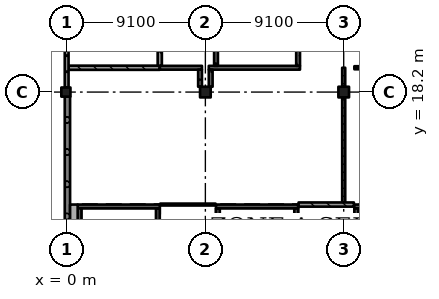
"""IFC4 building model, lengths in metres.
Left out: names, types, materials, properties, quantities, classifications, styles, units other than length and angle.
Written with IfcOpenShell. Run it as: python <this file> out.ifc"""

import sys

from ifc_helpers import new_model, si_unit, direction, frame, frame_2d, origin, origin_2d, place, context, subcontext, project, spatial, rectangle, extrude, element, fill, save


model = new_model("IFC4")
c1 = context("Model", 3, precision=1e-05, world=origin(), true_north=direction((0.0, 1.0)))
c2 = subcontext(c1, "Body", "Model", "MODEL_VIEW")
j1 = project(units=[si_unit("LENGTHUNIT", "METRE"), si_unit("PLANEANGLEUNIT", "RADIAN")], contexts=[c1])
p1 = place(None, origin())
s1 = spatial("IfcSite", under=j1, at=p1, CompositionType="ELEMENT")
p2 = place(p1, origin())
s2 = spatial("IfcBuilding", under=s1, at=p2, CompositionType="ELEMENT")
p3 = place(p2, frame((0.0, 0.0, 15.47)))
s3 = spatial("IfcBuildingStorey", under=s2, at=p3, CompositionType="ELEMENT", Elevation=15.47)
p4 = place(p3, frame((-0.075, 18.2, 0.0), z_axis=(0.0, 0.0, 1.0), x_axis=(1.0, 0.0, 0.0)))
e1 = element("IfcColumn", 1, at=p4, inside=s3, PredefinedType="COLUMN", context=c2, shape_type="SweptSolid", body=[
    extrude(rectangle(XDim=0.6, YDim=0.6, at=origin_2d()), origin(), (0.0, 0.0, 1.0), 4.55),
])
for number, where, z_axis, x_axis in (
    (2, (9.1, 18.2, 0.0), (0.0, 0.0, 1.0), (1.0, 0.0, 0.0)),
    (3, (18.2, 18.2, 0.0), (0.0, 0.0, 1.0), (1.0, 0.0, 0.0)),
):
    element("IfcColumn", number, at=place(p3, frame(where, z_axis=z_axis, x_axis=x_axis)), inside=s3, PredefinedType="COLUMN", context=c2, shape_type="SweptSolid", body=[
        extrude(rectangle(XDim=0.7, YDim=0.7, at=origin_2d()), origin(), (0.0, 0.0, 1.0), 4.55),
    ])
p5 = place(p3, frame((6.1, 10.675, 0.0), z_axis=(0.0, 0.0, 1.0), x_axis=(-1.0, 0.0, 0.0)))
e4 = element("IfcWall", 4, at=p5, inside=s3, PredefinedType="SHEAR", context=c2, shape_type="SweptSolid", body=[
    extrude(rectangle(XDim=5.4, YDim=0.25, at=frame_2d((2.7, 0.0))), origin(), (0.0, 0.0, 1.0), 4.55),
])
p6 = place(p5, frame((1.5, 0.0, 0.0)))
e5 = element("IfcOpeningElement", 5, at=p6, cuts=e4, PredefinedType="OPENING", context=c2, shape_type="SweptSolid", body=[
    extrude(rectangle(XDim=2.4, YDim=2.1, at=frame_2d((1.2, 1.05))), frame((0.0, 0.135, 0.0), z_axis=(0.0, -1.0, 0.0), x_axis=(1.0, 0.0, 0.0)), (0.0, 0.0, 1.0), 0.27),
])
for number, where, z_axis, x_axis in (
    (6, (0.825, 10.55, 0.0), (0.0, 0.0, 1.0), (0.0, -1.0, 0.0)),
    (7, (5.975, 10.55, 0.0), (0.0, 0.0, 1.0), (0.0, -1.0, 0.0)),
):
    element("IfcWall", number, at=place(p3, frame(where, z_axis=z_axis, x_axis=x_axis)), inside=s3, PredefinedType="SHEAR", context=c2, shape_type="SweptSolid", body=[
        extrude(rectangle(XDim=9.6, YDim=0.25, at=frame_2d((4.8, 0.0))), origin(), (0.0, 0.0, 1.0), 4.55),
    ])
p7 = place(p3, frame((15.2, 10.675, 0.0), z_axis=(0.0, 0.0, 1.0), x_axis=(-1.0, 0.0, 0.0)))
e8 = element("IfcWall", 8, at=p7, inside=s3, PredefinedType="SHEAR", context=c2, shape_type="SweptSolid", body=[
    extrude(rectangle(XDim=5.4, YDim=0.25, at=frame_2d((2.7, 0.0))), origin(), (0.0, 0.0, 1.0), 4.55),
])
p8 = place(p7, frame((1.5, 0.0, 0.0)))
e9 = element("IfcOpeningElement", 9, at=p8, cuts=e8, PredefinedType="OPENING", context=c2, shape_type="SweptSolid", body=[
    extrude(rectangle(XDim=2.4, YDim=2.1, at=frame_2d((1.2, 1.05))), frame((0.0, 0.135, 0.0), z_axis=(0.0, -1.0, 0.0), x_axis=(1.0, 0.0, 0.0)), (0.0, 0.0, 1.0), 0.27),
])
for number, where, z_axis, x_axis in (
    (10, (9.925, 10.55, 0.0), (0.0, 0.0, 1.0), (0.0, -1.0, 0.0)),
    (11, (15.075, 10.55, 0.0), (0.0, 0.0, 1.0), (0.0, -1.0, 0.0)),
):
    element("IfcWall", number, at=place(p3, frame(where, z_axis=z_axis, x_axis=x_axis)), inside=s3, PredefinedType="SHEAR", context=c2, shape_type="SweptSolid", body=[
        extrude(rectangle(XDim=9.6, YDim=0.25, at=frame_2d((4.8, 0.0))), origin(), (0.0, 0.0, 1.0), 4.55),
    ])
p9 = place(p3, frame((24.3, 10.675, 0.0), z_axis=(0.0, 0.0, 1.0), x_axis=(-1.0, 0.0, 0.0)))
e12 = element("IfcWall", 12, at=p9, inside=s3, PredefinedType="SHEAR", context=c2, shape_type="SweptSolid", body=[
    extrude(rectangle(XDim=5.4, YDim=0.25, at=frame_2d((2.7, 0.0))), origin(), (0.0, 0.0, 1.0), 4.55),
])
p10 = place(p9, frame((1.5, 0.0, 0.0)))
e13 = element("IfcOpeningElement", 13, at=p10, cuts=e12, PredefinedType="OPENING", context=c2, shape_type="SweptSolid", body=[
    extrude(rectangle(XDim=2.4, YDim=2.1, at=frame_2d((1.2, 1.05))), frame((0.0, 0.135, 0.0), z_axis=(0.0, -1.0, 0.0), x_axis=(1.0, 0.0, 0.0)), (0.0, 0.0, 1.0), 0.27),
])
p11 = place(p3, frame((19.025, 10.55, 0.0), z_axis=(0.0, 0.0, 1.0), x_axis=(0.0, -1.0, 0.0)))
e14 = element("IfcWall", 14, at=p11, inside=s3, PredefinedType="SHEAR", context=c2, shape_type="SweptSolid", body=[
    extrude(rectangle(XDim=9.6, YDim=0.25, at=frame_2d((4.8, 0.0))), origin(), (0.0, 0.0, 1.0), 4.55),
])
p12 = place(p3, frame((-0.025, 27.0, 0.0), z_axis=(0.0, 0.0, 1.0), x_axis=(0.0, -1.0, 0.0)))
e15 = element("IfcWall", 15, at=p12, inside=s3, PredefinedType="SOLIDWALL", context=c2, shape_type="SweptSolid", body=[
    extrude(rectangle(XDim=8.5, YDim=0.25, at=frame_2d((4.25, 0.0))), origin(), (0.0, 0.0, 1.0), 3.55),
])
p13 = place(p3, frame((0.025, 17.9, 0.0), z_axis=(0.0, 0.0, 1.0), x_axis=(0.0, -1.0, 0.0)))
e16 = element("IfcWall", 16, at=p13, inside=s3, PredefinedType="SOLIDWALL", context=c2, shape_type="SweptSolid", body=[
    extrude(rectangle(XDim=8.55, YDim=0.35, at=frame_2d((4.275, 0.0))), origin(), (0.0, 0.0, 1.0), 3.55),
])
p14 = place(p3, frame((0.45, 0.7, 0.0), z_axis=(0.0, 0.0, 1.0), x_axis=(0.0, 1.0, 0.0)))
e17 = element("IfcWall", 17, at=p14, inside=s3, PredefinedType="SOLIDWALL", context=c2, shape_type="SweptSolid", body=[
    extrude(rectangle(XDim=10.1, YDim=0.5, at=frame_2d((5.05, 0.0))), origin(), (0.0, 0.0, 1.0), 4.3),
])
p15 = place(p3, frame((0.1, 19.8, 0.0), z_axis=(0.0, 0.0, 1.0), x_axis=(1.0, 0.0, 0.0)))
e18 = element("IfcWall", 18, at=p15, inside=s3, PredefinedType="SOLIDWALL", context=c2, shape_type="SweptSolid", body=[
    extrude(rectangle(XDim=6.0, YDim=0.275, at=frame_2d((3.0, 0.0))), origin(), (0.0, 0.0, 1.0), 4.3),
])
p16 = place(p15, frame((2.65, 0.0, 0.0)))
e19 = element("IfcOpeningElement", 19, at=p16, cuts=e18, PredefinedType="OPENING", context=c2, shape_type="SweptSolid", body=[
    extrude(rectangle(XDim=1.2, YDim=2.4, at=frame_2d((0.6, 1.2))), frame((0.0, 0.147, 0.0), z_axis=(0.0, -1.0, 0.0), x_axis=(1.0, 0.0, 0.0)), (0.0, 0.0, 1.0), 0.295),
])
p17 = place(p3, frame((6.1, 19.8, 0.0), z_axis=(0.0, 0.0, 1.0), x_axis=(1.0, 0.0, 0.0)))
e20 = element("IfcWall", 20, at=p17, inside=s3, PredefinedType="SOLIDWALL", context=c2, shape_type="SweptSolid", body=[
    extrude(rectangle(XDim=2.775, YDim=0.25, at=frame_2d((1.387, 0.0))), origin(), (0.0, 0.0, 1.0), 4.3),
])
p18 = place(p17, frame((0.95, 0.0, 0.0)))
e21 = element("IfcOpeningElement", 21, at=p18, cuts=e20, PredefinedType="OPENING", context=c2, shape_type="SweptSolid", body=[
    extrude(rectangle(XDim=0.8, YDim=2.1, at=frame_2d((0.4, 1.05))), frame((0.0, 0.135, 0.0), z_axis=(0.0, -1.0, 0.0), x_axis=(1.0, 0.0, 0.0)), (0.0, 0.0, 1.0), 0.27),
])
p19 = place(p3, frame((6.1, 29.762, 0.0), z_axis=(0.0, 0.0, 1.0), x_axis=(0.0, -1.0, 0.0)))
e22 = element("IfcWall", 22, at=p19, inside=s3, PredefinedType="SOLIDWALL", context=c2, shape_type="SweptSolid", body=[
    extrude(rectangle(XDim=9.825, YDim=0.275, at=frame_2d((4.913, 0.0))), origin(), (0.0, 0.0, 1.0), 4.3),
])
p20 = place(p3, frame((8.75, 19.675, 0.0), z_axis=(0.0, 0.0, 1.0), x_axis=(0.0, -1.0, 0.0)))
e23 = element("IfcWall", 23, at=p20, inside=s3, PredefinedType="SOLIDWALL", context=c2, shape_type="SweptSolid", body=[
    extrude(rectangle(XDim=1.125, YDim=0.25, at=frame_2d((0.562, 0.0))), origin(), (0.0, 0.0, 1.0), 4.3),
])
p21 = place(p3, frame((9.325, 19.8, 0.0), z_axis=(0.0, 0.0, 1.0), x_axis=(1.0, 0.0, 0.0)))
e24 = element("IfcWall", 24, at=p21, inside=s3, PredefinedType="SOLIDWALL", context=c2, shape_type="SweptSolid", body=[
    extrude(rectangle(XDim=6.0, YDim=0.25, at=frame_2d((3.0, 0.0))), origin(), (0.0, 0.0, 1.0), 4.3),
])
p22 = place(p21, frame((2.825, 0.0, 0.0)))
e25 = element("IfcOpeningElement", 25, at=p22, cuts=e24, PredefinedType="OPENING", context=c2, shape_type="SweptSolid", body=[
    extrude(rectangle(XDim=0.8, YDim=2.1, at=frame_2d((0.4, 1.05))), frame((0.0, 0.135, 0.0), z_axis=(0.0, -1.0, 0.0), x_axis=(1.0, 0.0, 0.0)), (0.0, 0.0, 1.0), 0.27),
])
p23 = place(p3, frame((9.45, 18.55, 0.0), z_axis=(0.0, 0.0, 1.0), x_axis=(0.0, 1.0, 0.0)))
e26 = element("IfcWall", 26, at=p23, inside=s3, PredefinedType="SOLIDWALL", context=c2, shape_type="SweptSolid", body=[
    extrude(rectangle(XDim=1.125, YDim=0.25, at=frame_2d((0.562, 0.0))), origin(), (0.0, 0.0, 1.0), 4.3),
])
p24 = place(p3, frame((9.77, 10.8, 0.0), z_axis=(0.0, 0.0, 1.0), x_axis=(-1.0, 0.0, 0.0)))
e27 = element("IfcWall", 27, at=p24, inside=s3, PredefinedType="PARTITIONING", context=c2, shape_type="SweptSolid", body=[
    extrude(rectangle(XDim=3.64, YDim=0.125, at=frame_2d((1.82, 0.0))), origin(), (0.0, 0.0, 1.0), 4.3),
])
p25 = place(p24, frame((1.35, 0.0, 0.0)))
e28 = element("IfcOpeningElement", 28, at=p25, cuts=e27, PredefinedType="OPENING", context=c2, shape_type="SweptSolid", body=[
    extrude(rectangle(XDim=0.9, YDim=2.1, at=frame_2d((0.45, 1.05))), frame((0.0, 0.073, 0.0), z_axis=(0.0, -1.0, 0.0), x_axis=(1.0, 0.0, 0.0)), (0.0, 0.0, 1.0), 0.145),
])
p26 = place(p3, frame((9.8, 19.925, 0.0), z_axis=(0.0, 0.0, 1.0), x_axis=(0.0, 1.0, 0.0)))
e29 = element("IfcWall", 29, at=p26, inside=s3, PredefinedType="SOLIDWALL", context=c2, shape_type="SweptSolid", body=[
    extrude(rectangle(XDim=6.9, YDim=0.25, at=frame_2d((3.45, 0.0))), origin(), (0.0, 0.0, 1.0), 4.3),
])
p27 = place(p3, frame((15.2, 29.775, 0.0), z_axis=(0.0, 0.0, 1.0), x_axis=(0.0, -1.0, 0.0)))
e30 = element("IfcWall", 30, at=p27, inside=s3, PredefinedType="SOLIDWALL", context=c2, shape_type="SweptSolid", body=[
    extrude(rectangle(XDim=9.85, YDim=0.25, at=frame_2d((4.925, 0.0))), origin(), (0.0, 0.0, 1.0), 4.3),
])
p28 = place(p3, frame((15.23, 10.8, 0.0), z_axis=(0.0, 0.0, 1.0), x_axis=(1.0, 0.0, 0.0)))
e31 = element("IfcWall", 31, at=p28, inside=s3, PredefinedType="SOLIDWALL", context=c2, shape_type="SweptSolid", body=[
    extrude(rectangle(XDim=3.64, YDim=0.275, at=frame_2d((1.82, 0.0))), origin(), (0.0, 0.0, 1.0), 4.3),
])
p29 = place(p28, frame((0.92, 0.0, 0.0)))
e32 = element("IfcOpeningElement", 32, at=p29, cuts=e31, PredefinedType="OPENING", context=c2, shape_type="SweptSolid", body=[
    extrude(rectangle(XDim=1.2, YDim=2.4, at=frame_2d((0.6, 1.2))), frame((0.0, 0.147, 0.0), z_axis=(0.0, -1.0, 0.0), x_axis=(1.0, 0.0, 0.0)), (0.0, 0.0, 1.0), 0.295),
])
p30 = place(p3, frame((18.2, 17.85, 0.0), z_axis=(0.0, 0.0, 1.0), x_axis=(0.0, -1.0, 0.0)))
e33 = element("IfcWall", 33, at=p30, inside=s3, PredefinedType="PARTITIONING", context=c2, shape_type="SweptSolid", body=[
    extrude(rectangle(XDim=6.913, YDim=0.2, at=frame_2d((3.456, 0.0))), origin(), (0.0, 0.0, 1.0), 3.55),
])
p31 = place(p30, frame((0.85, 0.0, 0.0)))
e34 = element("IfcOpeningElement", 34, at=p31, cuts=e33, PredefinedType="OPENING", context=c2, shape_type="SweptSolid", body=[
    extrude(rectangle(XDim=1.8, YDim=2.4, at=frame_2d((0.9, 1.2))), frame((0.0, 0.11, 0.0), z_axis=(0.0, -1.0, 0.0), x_axis=(1.0, 0.0, 0.0)), (0.0, 0.0, 1.0), 0.22),
])
p32 = place(p30, frame((4.25, 0.0, 0.0)))
e35 = element("IfcOpeningElement", 35, at=p32, cuts=e33, PredefinedType="OPENING", context=c2, shape_type="SweptSolid", body=[
    extrude(rectangle(XDim=1.8, YDim=2.4, at=frame_2d((0.9, 1.2))), frame((0.0, 0.11, 0.0), z_axis=(0.0, -1.0, 0.0), x_axis=(1.0, 0.0, 0.0)), (0.0, 0.0, 1.0), 0.22),
])
p33 = place(p3, frame((18.2, 19.8, 0.0), z_axis=(0.0, 0.0, 1.0), x_axis=(0.0, -1.0, 0.0)))
e36 = element("IfcWall", 36, at=p33, inside=s3, PredefinedType="PARTITIONING", context=c2, shape_type="SweptSolid", body=[
    extrude(rectangle(XDim=1.25, YDim=0.2, at=frame_2d((0.625, 0.0))), origin(), (0.0, 0.0, 1.0), 3.55),
])
p34 = place(p3, frame((18.9, 19.8, 0.0), z_axis=(0.0, 0.0, 1.0), x_axis=(1.0, 0.0, 0.0)))
e37 = element("IfcWall", 37, at=p34, inside=s3, PredefinedType="PARTITIONING", context=c2, shape_type="SweptSolid", body=[
    extrude(rectangle(XDim=5.4, YDim=0.2, at=frame_2d((2.7, 0.0))), origin(), (0.0, 0.0, 1.0), 4.3),
])
p35 = place(p34, frame((1.85, 0.0, 0.0)))
e38 = element("IfcOpeningElement", 38, at=p35, cuts=e37, PredefinedType="OPENING", context=c2, shape_type="SweptSolid", body=[
    extrude(rectangle(XDim=1.8, YDim=2.4, at=frame_2d((0.9, 1.2))), frame((0.0, 0.11, 0.0), z_axis=(0.0, -1.0, 0.0), x_axis=(1.0, 0.0, 0.0)), (0.0, 0.0, 1.0), 0.22),
])
p36 = place(p18, origin())
e39 = element("IfcDoor", 39, at=p36, inside=s3, OperationType="SINGLE_SWING_RIGHT", PredefinedType="DOOR", context=c2, shape_type="SweptSolid", body=[
    extrude(rectangle(XDim=0.8, YDim=2.1, at=frame_2d((0.4, 1.05))), frame((0.0, 0.025, 0.0), z_axis=(0.0, -1.0, 0.0), x_axis=(1.0, 0.0, 0.0)), (0.0, 0.0, 1.0), 0.05),
])
fill(e21, e39)
p37 = place(p16, origin())
e40 = element("IfcDoor", 40, at=p37, inside=s3, OperationType="SINGLE_SWING_RIGHT", PredefinedType="DOOR", context=c2, shape_type="SweptSolid", body=[
    extrude(rectangle(XDim=1.2, YDim=2.4, at=frame_2d((0.6, 1.2))), frame((0.0, 0.025, 0.0), z_axis=(0.0, -1.0, 0.0), x_axis=(1.0, 0.0, 0.0)), (0.0, 0.0, 1.0), 0.05),
])
fill(e19, e40)
p38 = place(p22, origin())
e41 = element("IfcDoor", 41, at=p38, inside=s3, OperationType="SINGLE_SWING_RIGHT", PredefinedType="DOOR", context=c2, shape_type="SweptSolid", body=[
    extrude(rectangle(XDim=0.8, YDim=2.1, at=frame_2d((0.4, 1.05))), frame((0.0, 0.025, 0.0), z_axis=(0.0, -1.0, 0.0), x_axis=(1.0, 0.0, 0.0)), (0.0, 0.0, 1.0), 0.05),
])
fill(e25, e41)
p39 = place(p25, origin())
e42 = element("IfcDoor", 42, at=p39, inside=s3, OperationType="SINGLE_SWING_RIGHT", PredefinedType="DOOR", context=c2, shape_type="SweptSolid", body=[
    extrude(rectangle(XDim=0.9, YDim=2.1, at=frame_2d((0.45, 1.05))), frame((0.0, 0.025, 0.0), z_axis=(0.0, -1.0, 0.0), x_axis=(1.0, 0.0, 0.0)), (0.0, 0.0, 1.0), 0.05),
])
fill(e28, e42)
p40 = place(p29, origin())
e43 = element("IfcDoor", 43, at=p40, inside=s3, OperationType="SINGLE_SWING_RIGHT", PredefinedType="DOOR", context=c2, shape_type="SweptSolid", body=[
    extrude(rectangle(XDim=1.2, YDim=2.4, at=frame_2d((0.6, 1.2))), frame((0.0, 0.025, 0.0), z_axis=(0.0, -1.0, 0.0), x_axis=(1.0, 0.0, 0.0)), (0.0, 0.0, 1.0), 0.05),
])
fill(e32, e43)
p41 = place(p31, origin())
e44 = element("IfcDoor", 44, at=p41, inside=s3, OperationType="DOUBLE_DOOR_SINGLE_SWING", PredefinedType="DOOR", context=c2, shape_type="SweptSolid", body=[
    extrude(rectangle(XDim=1.8, YDim=2.4, at=frame_2d((0.9, 1.2))), frame((0.0, 0.025, 0.0), z_axis=(0.0, -1.0, 0.0), x_axis=(1.0, 0.0, 0.0)), (0.0, 0.0, 1.0), 0.05),
])
fill(e34, e44)
p42 = place(p32, origin())
e45 = element("IfcDoor", 45, at=p42, inside=s3, OperationType="DOUBLE_DOOR_SINGLE_SWING", PredefinedType="DOOR", context=c2, shape_type="SweptSolid", body=[
    extrude(rectangle(XDim=1.8, YDim=2.4, at=frame_2d((0.9, 1.2))), frame((0.0, 0.025, 0.0), z_axis=(0.0, -1.0, 0.0), x_axis=(1.0, 0.0, 0.0)), (0.0, 0.0, 1.0), 0.05),
])
fill(e35, e45)
p43 = place(p6, origin())
e46 = element("IfcDoor", 46, at=p43, inside=s3, OperationType="DOUBLE_DOOR_SINGLE_SWING", PredefinedType="DOOR", context=c2, shape_type="SweptSolid", body=[
    extrude(rectangle(XDim=2.4, YDim=2.1, at=frame_2d((1.2, 1.05))), frame((0.0, 0.025, 0.0), z_axis=(0.0, -1.0, 0.0), x_axis=(1.0, 0.0, 0.0)), (0.0, 0.0, 1.0), 0.05),
])
fill(e5, e46)
p44 = place(p8, origin())
e47 = element("IfcDoor", 47, at=p44, inside=s3, OperationType="DOUBLE_DOOR_SINGLE_SWING", PredefinedType="DOOR", context=c2, shape_type="SweptSolid", body=[
    extrude(rectangle(XDim=2.4, YDim=2.1, at=frame_2d((1.2, 1.05))), frame((0.0, 0.025, 0.0), z_axis=(0.0, -1.0, 0.0), x_axis=(1.0, 0.0, 0.0)), (0.0, 0.0, 1.0), 0.05),
])
fill(e9, e47)
save(model, sys.argv[1])
